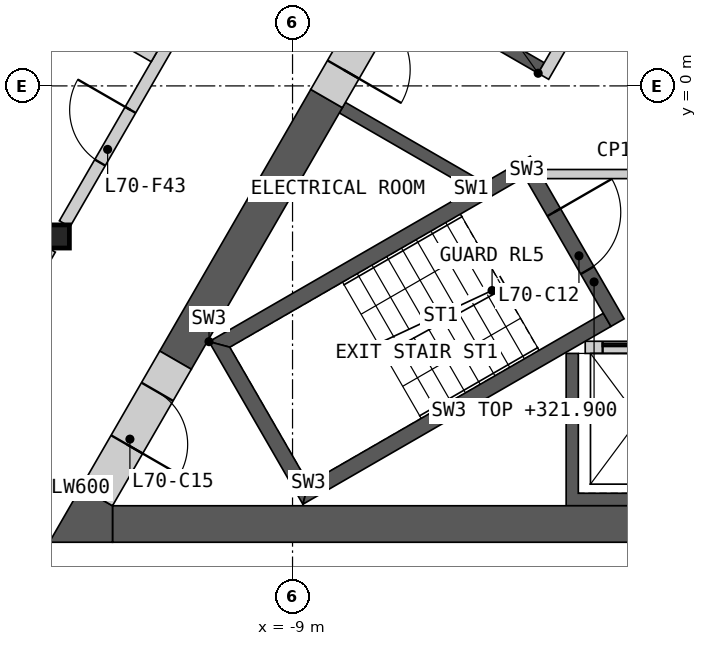
"""IFC4 building model, lengths in metres.
Left out: names, types, materials, properties, quantities, classifications, styles, units other than length and angle.
Written with IfcOpenShell. Run it as: python <this file> out.ifc"""

import sys

from ifc_helpers import new_model, si_unit, direction, frame, frame_2d, origin, origin_2d, place, context, subcontext, project, spatial, polyline, rectangle, i_section, outline, extrude, element, fill, save


model = new_model("IFC4")
c1 = context("Model", 3, precision=1e-05, world=origin(), true_north=direction((0.0, 1.0)))
c2 = subcontext(c1, "Body", "Model", "MODEL_VIEW")
j1 = project(units=[si_unit("LENGTHUNIT", "METRE"), si_unit("PLANEANGLEUNIT", "RADIAN")], contexts=[c1])
p1 = place(None, origin())
s1 = spatial("IfcSite", under=j1, at=p1, CompositionType="ELEMENT")
p2 = place(p1, origin())
s2 = spatial("IfcBuilding", under=s1, at=p2, CompositionType="ELEMENT")
p3 = place(p2, frame((0.0, 0.0, 318.8)))
s3 = spatial("IfcBuildingStorey", under=s2, at=p3, CompositionType="ELEMENT", Elevation=318.8)
p4 = place(p3, frame((-12.868, -2.476, 0.0), z_axis=(0.0, 0.0, 1.0), x_axis=(1.0, 0.0, 0.0)))
e1 = element("IfcColumn", 1, at=p4, inside=s3, PredefinedType="COLUMN", context=c2, shape_type="SweptSolid", body=[
    extrude(i_section(OverallWidth=0.396, OverallDepth=0.381, WebThickness=0.019, FlangeThickness=0.03, at=origin_2d()), origin(), (0.0, 0.0, 1.0), 3.4),
])
p5 = place(p3, origin())
e2 = element("IfcWall", 2, at=p5, inside=s3, PredefinedType="SHEAR", context=c2, shape_type="SweptSolid", body=[
    extrude(outline(polyline([(4.5, -4.4), (4.5, -6.906), (-4.5, -6.906), (-4.5, -4.4), (-4.3, -4.4), (-4.3, -6.7), (-2.3, -6.7), (-2.3, -4.4), (-2.1, -4.4), (-2.1, -6.7), (-0.1, -6.7), (-0.1, -4.4), (0.1, -4.4), (0.1, -6.7), (2.1, -6.7), (2.1, -4.4), (2.3, -4.4), (2.3, -6.7), (4.3, -6.7), (4.3, -4.4), (4.5, -4.4)])), origin(), (0.0, 0.0, 1.0), 3.1),
])
p6 = place(p3, frame((-4.187, -4.3, 0.0), z_axis=(0.0, 0.0, 1.0), x_axis=(1.0, 0.0, 0.0)))
e3 = element("IfcWall", 3, at=p6, inside=s3, PredefinedType="SOLIDWALL", context=c2, shape_type="SweptSolid", body=[
    extrude(rectangle(XDim=8.373, YDim=0.2, at=frame_2d((4.187, 0.0))), origin(), (0.0, 0.0, 1.0), 3.1),
])
p7 = place(p6, frame((0.287, 0.0, 0.0)))
e4 = element("IfcOpeningElement", 4, at=p7, cuts=e3, PredefinedType="OPENING", context=c2, shape_type="SweptSolid", body=[
    extrude(rectangle(XDim=1.2, YDim=2.1, at=frame_2d((0.6, 1.05))), frame((0.0, 0.11, 0.0), z_axis=(0.0, -1.0, 0.0), x_axis=(1.0, 0.0, 0.0)), (0.0, 0.0, 1.0), 0.22),
])
p8 = place(p6, frame((2.387, 0.0, 0.0)))
e5 = element("IfcOpeningElement", 5, at=p8, cuts=e3, PredefinedType="OPENING", context=c2, shape_type="SweptSolid", body=[
    extrude(rectangle(XDim=1.4, YDim=2.1, at=frame_2d((0.7, 1.05))), frame((0.0, 0.11, 0.0), z_axis=(0.0, -1.0, 0.0), x_axis=(1.0, 0.0, 0.0)), (0.0, 0.0, 1.0), 0.22),
])
p9 = place(p6, frame((4.737, 0.0, 0.0)))
e6 = element("IfcOpeningElement", 6, at=p9, cuts=e3, PredefinedType="OPENING", context=c2, shape_type="SweptSolid", body=[
    extrude(rectangle(XDim=1.1, YDim=2.1, at=frame_2d((0.55, 1.05))), frame((0.0, 0.11, 0.0), z_axis=(0.0, -1.0, 0.0), x_axis=(1.0, 0.0, 0.0)), (0.0, 0.0, 1.0), 0.22),
])
p10 = place(p6, frame((6.887, 0.0, 0.0)))
e7 = element("IfcOpeningElement", 7, at=p10, cuts=e3, PredefinedType="OPENING", context=c2, shape_type="SweptSolid", body=[
    extrude(rectangle(XDim=1.2, YDim=2.1, at=frame_2d((0.6, 1.05))), frame((0.0, 0.11, 0.0), z_axis=(0.0, -1.0, 0.0), x_axis=(1.0, 0.0, 0.0)), (0.0, 0.0, 1.0), 0.22),
])
p11 = place(p3, origin())
e8 = element("IfcWall", 8, at=p11, inside=s3, PredefinedType="SHEAR", context=c2, shape_type="SweptSolid", body=[
    extrude(outline(polyline([(-6.061, -1.697), (-8.231, -0.444), (-8.131, -0.271), (-5.96, -1.524), (-6.061, -1.697)])), origin(), (0.0, 0.0, 1.0), 3.1),
])
p12 = place(p3, origin())
e9 = element("IfcWall", 9, at=p12, inside=s3, PredefinedType="SHEAR", context=c2, shape_type="SweptSolid", body=[
    extrude(outline(polyline([(-4.96, 0.208), (-7.131, 1.461), (-3.731, 7.35), (-1.561, 6.097), (-1.66, 5.924), (-3.652, 7.074), (-5.752, 3.437), (-3.76, 2.287), (-3.861, 2.113), (-5.852, 3.263), (-6.852, 1.531), (-4.861, 0.381), (-4.96, 0.208)])), origin(), (0.0, 0.0, 1.0), 3.1),
])
p13 = place(p3, frame((-1.631, 5.776, 0.0), z_axis=(0.0, 0.0, 1.0), x_axis=(-0.499992876559, -0.866029516466, 0.0)))
e10 = element("IfcWall", 10, at=p13, inside=s3, PredefinedType="SOLIDWALL", context=c2, shape_type="SweptSolid", body=[
    extrude(rectangle(XDim=6.486, YDim=0.2, at=frame_2d((3.243, 0.0))), origin(), (0.0, 0.0, 1.0), 3.1),
])
p14 = place(p13, frame((1.537, 0.0, 0.0)))
e11 = element("IfcOpeningElement", 11, at=p14, cuts=e10, PredefinedType="OPENING", context=c2, shape_type="SweptSolid", body=[
    extrude(rectangle(XDim=0.9, YDim=2.1, at=frame_2d((0.45, 1.05))), frame((0.0, 0.11, 0.0), z_axis=(0.0, -1.0, 0.0), x_axis=(1.0, 0.0, 0.0)), (0.0, 0.0, 1.0), 0.22),
])
p15 = place(p13, frame((4.837, 0.0, 0.0)))
e12 = element("IfcOpeningElement", 12, at=p15, cuts=e10, PredefinedType="OPENING", context=c2, shape_type="SweptSolid", body=[
    extrude(rectangle(XDim=0.9, YDim=2.1, at=frame_2d((0.45, 1.05))), frame((0.0, 0.11, 0.0), z_axis=(0.0, -1.0, 0.0), x_axis=(1.0, 0.0, 0.0)), (0.0, 0.0, 1.0), 0.22),
])
p16 = place(p3, frame((-4.941, -1.45, 0.0), z_axis=(0.0, 0.0, 1.0), x_axis=(1.0, 0.0, 0.0)))
e13 = element("IfcWall", 13, at=p16, inside=s3, PredefinedType="PARTITIONING", context=c2, shape_type="SweptSolid", body=[
    extrude(rectangle(XDim=9.882, YDim=0.15, at=frame_2d((4.941, 0.0))), origin(), (0.0, 0.0, 1.0), 3.1),
])
p17 = place(p16, frame((4.391, 0.0, 0.0)))
e14 = element("IfcOpeningElement", 14, at=p17, cuts=e13, PredefinedType="OPENING", context=c2, shape_type="SweptSolid", body=[
    extrude(rectangle(XDim=1.1, YDim=2.1, at=frame_2d((0.55, 1.05))), frame((0.0, 0.085, 0.0), z_axis=(0.0, -1.0, 0.0), x_axis=(1.0, 0.0, 0.0)), (0.0, 0.0, 1.0), 0.17),
])
p18 = place(p3, origin())
e15 = element("IfcWall", 15, at=p18, inside=s3, PredefinedType="SHEAR", context=c2, shape_type="SweptSolid", body=[
    extrude(outline(polyline([(-5.307, -1.281), (-10.374, -4.206), (-10.032, -4.298), (-5.182, -1.498), (-5.307, -1.281)])), origin(), (0.0, 0.0, 1.0), 3.1),
])
p19 = place(p3, origin())
e16 = element("IfcWall", 16, at=p19, inside=s3, PredefinedType="SHEAR", context=c2, shape_type="SweptSolid", body=[
    extrude(outline(polyline([(-10.374, -4.206), (-8.83, -6.881), (-8.738, -6.539), (-10.032, -4.298), (-10.374, -4.206)])), origin(), (0.0, 0.0, 1.0), 3.1),
])
p20 = place(p3, origin())
e17 = element("IfcWall", 17, at=p20, inside=s3, PredefinedType="SHEAR", context=c2, shape_type="SweptSolid", body=[
    extrude(outline(polyline([(-8.738, -6.539), (-8.83, -6.881), (-3.763, -3.956), (-3.888, -3.739), (-8.738, -6.539)])), origin(), (0.0, 0.0, 1.0), 3.1),
])
p21 = place(p3, frame((-5.199, -1.219, 0.0), z_axis=(0.0, 0.0, 1.0), x_axis=(0.499982516597, -0.866035497597, 0.0)))
e18 = element("IfcWall", 18, at=p21, inside=s3, PredefinedType="SHEAR", context=c2, shape_type="SweptSolid", body=[
    extrude(rectangle(XDim=3.088, YDim=0.25, at=frame_2d((1.544, 0.0))), origin(), (0.0, 0.0, 1.0), 3.1),
])
p22 = place(p21, frame((0.994, 0.0, 0.0)))
e19 = element("IfcOpeningElement", 19, at=p22, cuts=e18, PredefinedType="OPENING", context=c2, shape_type="SweptSolid", body=[
    extrude(rectangle(XDim=1.1, YDim=2.1, at=frame_2d((0.55, 1.05))), frame((0.0, 0.135, 0.0), z_axis=(0.0, -1.0, 0.0), x_axis=(1.0, 0.0, 0.0)), (0.0, 0.0, 1.0), 0.27),
])
p23 = place(p3, frame((-11.961, -7.206, 0.0), z_axis=(0.0, 0.0, 1.0), x_axis=(1.0, 0.0, 0.0)))
e20 = element("IfcWall", 20, at=p23, inside=s3, PredefinedType="SHEAR", context=c2, shape_type="SweptSolid", body=[
    extrude(rectangle(XDim=23.921, YDim=0.6, at=frame_2d((11.961, 0.0))), origin(), (0.0, 0.0, 1.0), 3.1),
])
p24 = place(p3, frame((-8.44, -0.208, 0.0), z_axis=(0.0, 0.0, 1.0), x_axis=(-0.500007425856, -0.866021116422, 0.0)))
e21 = element("IfcWall", 21, at=p24, inside=s3, PredefinedType="SHEAR", context=c2, shape_type="SweptSolid", body=[
    extrude(rectangle(XDim=4.969, YDim=0.6, at=frame_2d((2.484, 0.0))), origin(), (0.0, 0.0, 1.0), 3.1),
])
p25 = place(p3, origin())
e22 = element("IfcWall", 22, at=p25, inside=s3, PredefinedType="SHEAR", context=c2, shape_type="SweptSolid", body=[
    extrude(outline(polyline([(-12.48, -6.606), (-11.961, -6.906), (-11.961, -7.506), (-13.0, -7.506), (-12.48, -6.606)])), origin(), (0.0, 0.0, 1.0), 3.1),
])
p26 = place(p3, frame((-10.925, -4.511, 0.0), z_axis=(0.0, 0.0, 1.0), x_axis=(-0.500018667571, -0.866014625789, 0.0)))
e23 = element("IfcWall", 23, at=p26, inside=s3, PredefinedType="SHEAR", context=c2, shape_type="SweptSolid", body=[
    extrude(rectangle(XDim=2.592, YDim=0.6, at=frame_2d((1.296, 0.0))), origin(), (0.0, 0.0, 1.0), 3.1),
])
p27 = place(p26, frame((0.6, 0.0, 0.0)))
e24 = element("IfcOpeningElement", 24, at=p27, cuts=e23, PredefinedType="OPENING", context=c2, shape_type="SweptSolid", body=[
    extrude(rectangle(XDim=1.0, YDim=2.1, at=frame_2d((0.5, 1.05))), frame((0.0, 0.31, 0.0), z_axis=(0.0, -1.0, 0.0), x_axis=(1.0, 0.0, 0.0)), (0.0, 0.0, 1.0), 0.62),
])
p28 = place(p3, frame((-7.34, 1.698, 0.0), z_axis=(0.0, 0.0, 1.0), x_axis=(-0.50002983664, -0.866008176907, 0.0)))
e25 = element("IfcWall", 25, at=p28, inside=s3, PredefinedType="SHEAR", context=c2, shape_type="SweptSolid", body=[
    extrude(rectangle(XDim=2.2, YDim=0.6, at=frame_2d((1.1, 0.0))), origin(), (0.0, 0.0, 1.0), 3.1),
])
p29 = place(p28, frame((0.55, 0.0, 0.0)))
e26 = element("IfcOpeningElement", 26, at=p29, cuts=e25, PredefinedType="OPENING", context=c2, shape_type="SweptSolid", body=[
    extrude(rectangle(XDim=1.1, YDim=2.1, at=frame_2d((0.55, 1.05))), frame((0.0, 0.31, 0.0), z_axis=(0.0, -1.0, 0.0), x_axis=(1.0, 0.0, 0.0)), (0.0, 0.0, 1.0), 0.62),
])
p30 = place(p3, frame((-12.748, -2.269, 0.0), z_axis=(0.0, 0.0, 1.0), x_axis=(0.499984266882, 0.866034487114, 0.0)))
e27 = element("IfcWall", 27, at=p30, inside=s3, PredefinedType="PARTITIONING", context=c2, shape_type="SweptSolid", body=[
    extrude(rectangle(XDim=8.099, YDim=0.2, at=frame_2d((4.049, 0.0))), origin(), (0.0, 0.0, 1.0), 3.1),
])
p31 = place(p30, frame((1.164, 0.0, 0.0)))
e28 = element("IfcOpeningElement", 28, at=p31, cuts=e27, PredefinedType="OPENING", context=c2, shape_type="SweptSolid", body=[
    extrude(rectangle(XDim=1.0, YDim=2.1, at=frame_2d((0.5, 1.05))), frame((0.0, 0.11, 0.0), z_axis=(0.0, -1.0, 0.0), x_axis=(1.0, 0.0, 0.0)), (0.0, 0.0, 1.0), 0.22),
])
p32 = place(p3, frame((-16.055, 3.273, 0.0), z_axis=(0.0, 0.0, 1.0), x_axis=(0.866019581949, -0.500010083578, 0.0)))
e29 = element("IfcWall", 29, at=p32, inside=s3, PredefinedType="PARTITIONING", context=c2, shape_type="SweptSolid", body=[
    extrude(rectangle(XDim=5.535, YDim=0.25, at=frame_2d((2.768, 0.0))), origin(), (0.0, 0.0, 1.0), 2.33),
])
p33 = place(p3, frame((-15.131, -6.397, 0.0), z_axis=(0.0, 0.0, 1.0), x_axis=(0.500003406062, 0.866023437285, 0.0)))
e30 = element("IfcWall", 30, at=p33, inside=s3, PredefinedType="PARTITIONING", context=c2, shape_type="SweptSolid", body=[
    extrude(rectangle(XDim=4.288, YDim=0.2, at=frame_2d((2.144, 0.0))), origin(), (0.0, 0.0, 1.0), 3.1),
])
p34 = place(p7, origin())
e31 = element("IfcDoor", 31, at=p34, inside=s3, OperationType="SLIDING_TO_LEFT", PredefinedType="DOOR", context=c2, shape_type="SweptSolid", body=[
    extrude(rectangle(XDim=1.2, YDim=2.1, at=frame_2d((0.6, 1.05))), frame((0.0, 0.025, 0.0), z_axis=(0.0, -1.0, 0.0), x_axis=(1.0, 0.0, 0.0)), (0.0, 0.0, 1.0), 0.05),
])
fill(e4, e31)
p35 = place(p22, origin())
e32 = element("IfcDoor", 32, at=p35, inside=s3, OperationType="SINGLE_SWING_LEFT", PredefinedType="DOOR", context=c2, shape_type="SweptSolid", body=[
    extrude(rectangle(XDim=1.1, YDim=2.1, at=frame_2d((0.55, 1.05))), frame((0.0, 0.025, 0.0), z_axis=(0.0, -1.0, 0.0), x_axis=(1.0, 0.0, 0.0)), (0.0, 0.0, 1.0), 0.05),
])
fill(e19, e32)
p36 = place(p27, origin())
e33 = element("IfcDoor", 33, at=p36, inside=s3, OperationType="SINGLE_SWING_RIGHT", PredefinedType="DOOR", context=c2, shape_type="SweptSolid", body=[
    extrude(rectangle(XDim=1.0, YDim=2.1, at=frame_2d((0.5, 1.05))), frame((0.0, 0.055, 0.0), z_axis=(0.0, -1.0, 0.0), x_axis=(1.0, 0.0, 0.0)), (0.0, 0.0, 1.0), 0.05),
])
fill(e24, e33)
p37 = place(p29, origin())
e34 = element("IfcDoor", 34, at=p37, inside=s3, OperationType="SINGLE_SWING_RIGHT", PredefinedType="DOOR", context=c2, shape_type="SweptSolid", body=[
    extrude(rectangle(XDim=1.1, YDim=2.1, at=frame_2d((0.55, 1.05))), frame((0.0, 0.055, 0.0), z_axis=(0.0, -1.0, 0.0), x_axis=(1.0, 0.0, 0.0)), (0.0, 0.0, 1.0), 0.05),
])
fill(e26, e34)
p38 = place(p31, origin())
e35 = element("IfcDoor", 35, at=p38, inside=s3, OperationType="SINGLE_SWING_RIGHT", PredefinedType="DOOR", context=c2, shape_type="SweptSolid", body=[
    extrude(rectangle(XDim=1.0, YDim=2.1, at=frame_2d((0.5, 1.05))), frame((0.0, 0.025, 0.0), z_axis=(0.0, -1.0, 0.0), x_axis=(1.0, 0.0, 0.0)), (0.0, 0.0, 1.0), 0.05),
])
fill(e28, e35)
save(model, sys.argv[1])
